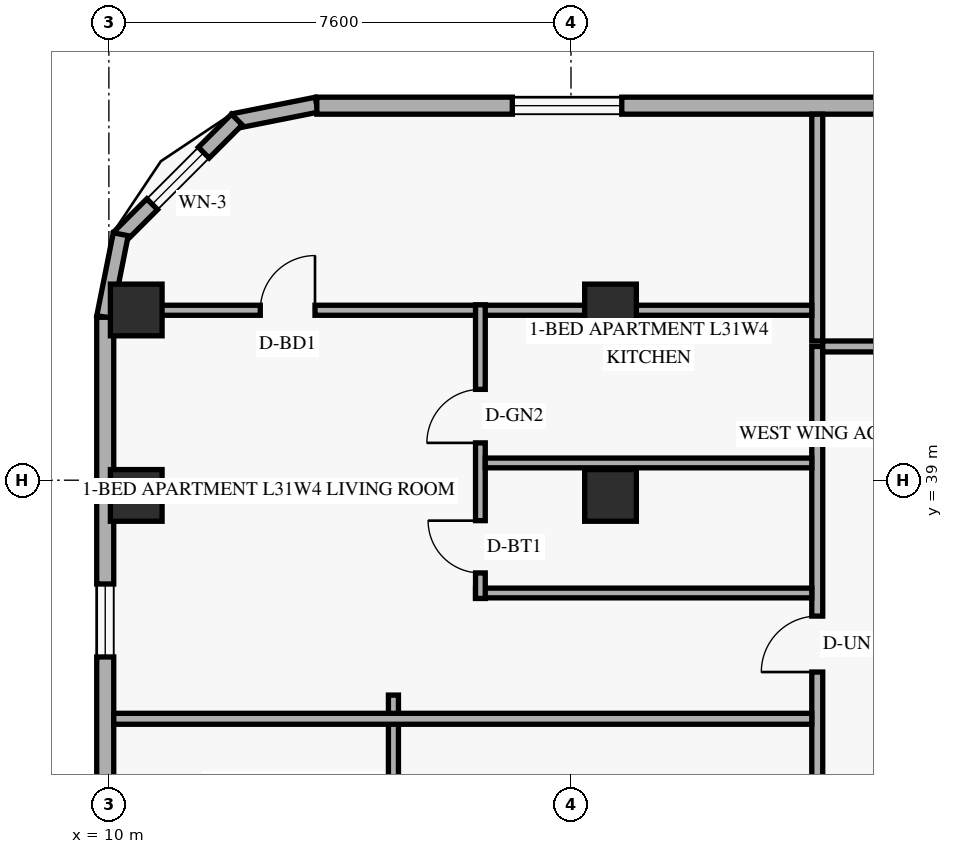
"""IFC4 building model, lengths in metres.
Left out: names, types, materials, properties, quantities, classifications, styles, units other than length and angle.
Written with IfcOpenShell. Run it as: python <this file> out.ifc"""

import sys

from ifc_helpers import new_model, si_unit, direction, frame, frame_2d, origin, origin_2d, place, context, subcontext, project, spatial, rectangle, extrude, element, fill, save


model = new_model("IFC4")
c1 = context("Model", 3, precision=1e-05, world=origin(), true_north=direction((0.0, 1.0)))
c2 = subcontext(c1, "Body", "Model", "MODEL_VIEW")
j1 = project(units=[si_unit("LENGTHUNIT", "METRE"), si_unit("PLANEANGLEUNIT", "RADIAN")], contexts=[c1])
p1 = place(None, origin())
s1 = spatial("IfcSite", under=j1, at=p1, CompositionType="ELEMENT")
p2 = place(p1, origin())
s2 = spatial("IfcBuilding", under=s1, at=p2, CompositionType="ELEMENT")
p3 = place(p2, frame((0.0, 0.0, 121.2)))
s3 = spatial("IfcBuildingStorey", under=s2, at=p3, CompositionType="ELEMENT", Elevation=121.2)
for number, where, z_axis, x_axis in (
    (1, (10.45, 38.75, 0.0), (0.0, 0.0, 1.0), (1.0, 0.0, 0.0)),
    (2, (10.45, 41.8, 0.0), (0.0, 0.0, 1.0), (1.0, 0.0, 0.0)),
    (3, (18.25, 38.75, 0.0), (0.0, 0.0, 1.0), (1.0, 0.0, 0.0)),
    (4, (18.25, 41.8, 0.0), (0.0, 0.0, 1.0), (1.0, 0.0, 0.0)),
):
    element("IfcColumn", number, at=place(p3, frame(where, z_axis=z_axis, x_axis=x_axis)), inside=s3, PredefinedType="COLUMN", context=c2, shape_type="SweptSolid", body=[
        extrude(rectangle(XDim=0.85, YDim=0.85, at=origin_2d()), origin(), (0.0, 0.0, 1.0), 3.6),
    ])
p4 = place(p3, frame((13.417, 45.176, 0.0), z_axis=(0.0, 0.0, 1.0), x_axis=(-0.980809899341, -0.19496651342, 0.0)))
e5 = element("IfcWall", 5, at=p4, inside=s3, PredefinedType="SOLIDWALL", context=c2, shape_type="SweptSolid", body=[
    extrude(rectangle(XDim=1.389, YDim=0.25, at=frame_2d((0.694, 0.0))), origin(), (0.0, 0.0, 1.0), 3.36),
])
p5 = place(p3, frame((12.105, 44.932, 0.0), z_axis=(0.0, 0.0, 1.0), x_axis=(-0.707151344399, -0.707062215165, 0.0)))
e6 = element("IfcWall", 6, at=p5, inside=s3, PredefinedType="SOLIDWALL", context=c2, shape_type="SweptSolid", body=[
    extrude(rectangle(XDim=2.739, YDim=0.25, at=frame_2d((1.37, 0.0))), origin(), (0.0, 0.0, 1.0), 3.36),
])
p6 = place(p5, frame((0.77, 0.0, 0.85)))
e7 = element("IfcOpeningElement", 7, at=p6, cuts=e6, PredefinedType="OPENING", context=c2, shape_type="SweptSolid", body=[
    extrude(rectangle(XDim=1.2, YDim=1.5, at=frame_2d((0.6, 0.75))), frame((0.0, 0.135, 0.0), z_axis=(0.0, -1.0, 0.0), x_axis=(1.0, 0.0, 0.0)), (0.0, 0.0, 1.0), 0.27),
])
p7 = place(p3, frame((10.195, 43.045, 0.0), z_axis=(0.0, 0.0, 1.0), x_axis=(-0.195000137217, -0.980803214965, 0.0)))
e8 = element("IfcWall", 8, at=p7, inside=s3, PredefinedType="SOLIDWALL", context=c2, shape_type="SweptSolid", body=[
    extrude(rectangle(XDim=1.388, YDim=0.25, at=frame_2d((0.694, 0.0))), origin(), (0.0, 0.0, 1.0), 3.36),
])
p8 = place(p3, frame((49.98, 45.16, 0.0), z_axis=(0.0, 0.0, 1.0), x_axis=(-1.0, 0.0, 0.0)))
e9 = element("IfcWall", 9, at=p8, inside=s3, PredefinedType="SOLIDWALL", context=c2, shape_type="SweptSolid", body=[
    extrude(rectangle(XDim=36.56, YDim=0.28, at=frame_2d((18.28, 0.0))), origin(), (0.0, 0.0, 1.0), 3.36),
])
p9 = place(p8, frame((31.545, 0.0, 0.85)))
e10 = element("IfcOpeningElement", 10, at=p9, cuts=e9, PredefinedType="OPENING", context=c2, shape_type="SweptSolid", body=[
    extrude(rectangle(XDim=1.8, YDim=1.6, at=frame_2d((0.9, 0.8))), frame((0.0, 0.15, 0.0), z_axis=(0.0, -1.0, 0.0), x_axis=(1.0, 0.0, 0.0)), (0.0, 0.0, 1.0), 0.3),
])
p10 = place(p8, frame((23.48, 0.0, 0.85)))
e11 = element("IfcOpeningElement", 11, at=p10, cuts=e9, PredefinedType="OPENING", context=c2, shape_type="SweptSolid", body=[
    extrude(rectangle(XDim=1.8, YDim=1.6, at=frame_2d((0.9, 0.8))), frame((0.0, 0.15, 0.0), z_axis=(0.0, -1.0, 0.0), x_axis=(1.0, 0.0, 0.0)), (0.0, 0.0, 1.0), 0.3),
])
p11 = place(p8, frame((16.595, 0.0, 0.85)))
e12 = element("IfcOpeningElement", 12, at=p11, cuts=e9, PredefinedType="OPENING", context=c2, shape_type="SweptSolid", body=[
    extrude(rectangle(XDim=1.8, YDim=1.6, at=frame_2d((0.9, 0.8))), frame((0.0, 0.15, 0.0), z_axis=(0.0, -1.0, 0.0), x_axis=(1.0, 0.0, 0.0)), (0.0, 0.0, 1.0), 0.3),
])
p12 = place(p8, frame((10.365, 0.0, 0.85)))
e13 = element("IfcOpeningElement", 13, at=p12, cuts=e9, PredefinedType="OPENING", context=c2, shape_type="SweptSolid", body=[
    extrude(rectangle(XDim=1.8, YDim=1.6, at=frame_2d((0.9, 0.8))), frame((0.0, 0.15, 0.0), z_axis=(0.0, -1.0, 0.0), x_axis=(1.0, 0.0, 0.0)), (0.0, 0.0, 1.0), 0.3),
])
p13 = place(p8, frame((4.575, 0.0, 0.85)))
e14 = element("IfcOpeningElement", 14, at=p13, cuts=e9, PredefinedType="OPENING", context=c2, shape_type="SweptSolid", body=[
    extrude(rectangle(XDim=1.8, YDim=1.6, at=frame_2d((0.9, 0.8))), frame((0.0, 0.15, 0.0), z_axis=(0.0, -1.0, 0.0), x_axis=(1.0, 0.0, 0.0)), (0.0, 0.0, 1.0), 0.3),
])
p14 = place(p8, frame((0.59, 0.0, 0.85)))
e15 = element("IfcOpeningElement", 15, at=p14, cuts=e9, PredefinedType="OPENING", context=c2, shape_type="SweptSolid", body=[
    extrude(rectangle(XDim=1.8, YDim=1.6, at=frame_2d((0.9, 0.8))), frame((0.0, 0.15, 0.0), z_axis=(0.0, -1.0, 0.0), x_axis=(1.0, 0.0, 0.0)), (0.0, 0.0, 1.0), 0.3),
])
p15 = place(p3, frame((9.94, 41.68, 0.0), z_axis=(0.0, 0.0, 1.0), x_axis=(0.0, -1.0, 0.0)))
e16 = element("IfcWall", 16, at=p15, inside=s3, PredefinedType="SOLIDWALL", context=c2, shape_type="SweptSolid", body=[
    extrude(rectangle(XDim=35.36, YDim=0.28, at=frame_2d((17.68, 0.0))), origin(), (0.0, 0.0, 1.0), 3.36),
])
p16 = place(p15, frame((29.773, 0.0, 0.85)))
e17 = element("IfcOpeningElement", 17, at=p16, cuts=e16, PredefinedType="OPENING", context=c2, shape_type="SweptSolid", body=[
    extrude(rectangle(XDim=1.2, YDim=1.5, at=frame_2d((0.6, 0.75))), frame((0.0, 0.15, 0.0), z_axis=(0.0, -1.0, 0.0), x_axis=(1.0, 0.0, 0.0)), (0.0, 0.0, 1.0), 0.3),
])
p17 = place(p15, frame((26.063, 0.0, 0.85)))
e18 = element("IfcOpeningElement", 18, at=p17, cuts=e16, PredefinedType="OPENING", context=c2, shape_type="SweptSolid", body=[
    extrude(rectangle(XDim=1.2, YDim=1.5, at=frame_2d((0.6, 0.75))), frame((0.0, 0.15, 0.0), z_axis=(0.0, -1.0, 0.0), x_axis=(1.0, 0.0, 0.0)), (0.0, 0.0, 1.0), 0.3),
])
p18 = place(p15, frame((19.032, 0.0, 0.85)))
e19 = element("IfcOpeningElement", 19, at=p18, cuts=e16, PredefinedType="OPENING", context=c2, shape_type="SweptSolid", body=[
    extrude(rectangle(XDim=1.2, YDim=1.5, at=frame_2d((0.6, 0.75))), frame((0.0, 0.15, 0.0), z_axis=(0.0, -1.0, 0.0), x_axis=(1.0, 0.0, 0.0)), (0.0, 0.0, 1.0), 0.3),
])
p19 = place(p15, frame((14.2, 0.0, 0.85)))
e20 = element("IfcOpeningElement", 20, at=p19, cuts=e16, PredefinedType="OPENING", context=c2, shape_type="SweptSolid", body=[
    extrude(rectangle(XDim=1.2, YDim=1.5, at=frame_2d((0.6, 0.75))), frame((0.0, 0.15, 0.0), z_axis=(0.0, -1.0, 0.0), x_axis=(1.0, 0.0, 0.0)), (0.0, 0.0, 1.0), 0.3),
])
p20 = place(p15, frame((7.956, 0.0, 0.85)))
e21 = element("IfcOpeningElement", 21, at=p20, cuts=e16, PredefinedType="OPENING", context=c2, shape_type="SweptSolid", body=[
    extrude(rectangle(XDim=1.2, YDim=1.5, at=frame_2d((0.6, 0.75))), frame((0.0, 0.15, 0.0), z_axis=(0.0, -1.0, 0.0), x_axis=(1.0, 0.0, 0.0)), (0.0, 0.0, 1.0), 0.3),
])
p21 = place(p15, frame((4.387, 0.0, 0.85)))
e22 = element("IfcOpeningElement", 22, at=p21, cuts=e16, PredefinedType="OPENING", context=c2, shape_type="SweptSolid", body=[
    extrude(rectangle(XDim=1.2, YDim=1.5, at=frame_2d((0.6, 0.75))), frame((0.0, 0.15, 0.0), z_axis=(0.0, -1.0, 0.0), x_axis=(1.0, 0.0, 0.0)), (0.0, 0.0, 1.0), 0.3),
])
p22 = place(p3, frame((21.65, 6.8, 0.0), z_axis=(0.0, 0.0, 1.0), x_axis=(0.0, 1.0, 0.0)))
e23 = element("IfcWall", 23, at=p22, inside=s3, PredefinedType="STANDARD", context=c2, shape_type="SweptSolid", body=[
    extrude(rectangle(XDim=34.4, YDim=0.18, at=frame_2d((17.2, 0.0))), origin(), (0.0, 0.0, 1.0), 2.731),
])
p23 = place(p22, frame((4.472, 0.0, 0.0)))
e24 = element("IfcOpeningElement", 24, at=p23, cuts=e23, PredefinedType="OPENING", context=c2, shape_type="SweptSolid", body=[
    extrude(rectangle(XDim=0.92, YDim=2.15, at=frame_2d((0.46, 1.075))), frame((0.0, 0.1, 0.0), z_axis=(0.0, -1.0, 0.0), x_axis=(1.0, 0.0, 0.0)), (0.0, 0.0, 1.0), 0.2),
])
p24 = place(p22, frame((7.261, 0.0, 0.0)))
e25 = element("IfcOpeningElement", 25, at=p24, cuts=e23, PredefinedType="OPENING", context=c2, shape_type="SweptSolid", body=[
    extrude(rectangle(XDim=0.92, YDim=2.15, at=frame_2d((0.46, 1.075))), frame((0.0, 0.1, 0.0), z_axis=(0.0, -1.0, 0.0), x_axis=(1.0, 0.0, 0.0)), (0.0, 0.0, 1.0), 0.2),
])
p25 = place(p22, frame((18.308, 0.0, 0.0)))
e26 = element("IfcOpeningElement", 26, at=p25, cuts=e23, PredefinedType="OPENING", context=c2, shape_type="SweptSolid", body=[
    extrude(rectangle(XDim=0.92, YDim=2.15, at=frame_2d((0.46, 1.075))), frame((0.0, 0.1, 0.0), z_axis=(0.0, -1.0, 0.0), x_axis=(1.0, 0.0, 0.0)), (0.0, 0.0, 1.0), 0.2),
])
p26 = place(p22, frame((29.045, 0.0, 0.0)))
e27 = element("IfcOpeningElement", 27, at=p26, cuts=e23, PredefinedType="OPENING", context=c2, shape_type="SweptSolid", body=[
    extrude(rectangle(XDim=0.92, YDim=2.15, at=frame_2d((0.46, 1.075))), frame((0.0, 0.1, 0.0), z_axis=(0.0, -1.0, 0.0), x_axis=(1.0, 0.0, 0.0)), (0.0, 0.0, 1.0), 0.2),
])
p27 = place(p3, frame((21.74, 41.2, 0.0), z_axis=(0.0, 0.0, 1.0), x_axis=(1.0, 0.0, 0.0)))
e28 = element("IfcWall", 28, at=p27, inside=s3, PredefinedType="STANDARD", context=c2, shape_type="SweptSolid", body=[
    extrude(rectangle(XDim=13.68, YDim=0.18, at=frame_2d((6.84, 0.0))), origin(), (0.0, 0.0, 1.0), 2.731),
])
p28 = place(p27, frame((3.09, 0.0, 0.0)))
e29 = element("IfcOpeningElement", 29, at=p28, cuts=e28, PredefinedType="OPENING", context=c2, shape_type="SweptSolid", body=[
    extrude(rectangle(XDim=0.95, YDim=2.15, at=frame_2d((0.475, 1.075))), frame((0.0, 0.1, 0.0), z_axis=(0.0, -1.0, 0.0), x_axis=(1.0, 0.0, 0.0)), (0.0, 0.0, 1.0), 0.2),
])
p29 = place(p27, frame((10.11, 0.0, 0.0)))
e30 = element("IfcOpeningElement", 30, at=p29, cuts=e28, PredefinedType="OPENING", context=c2, shape_type="SweptSolid", body=[
    extrude(rectangle(XDim=0.95, YDim=2.15, at=frame_2d((0.475, 1.075))), frame((0.0, 0.1, 0.0), z_axis=(0.0, -1.0, 0.0), x_axis=(1.0, 0.0, 0.0)), (0.0, 0.0, 1.0), 0.2),
])
p30 = place(p3, frame((21.65, 41.29, 0.0), z_axis=(0.0, 0.0, 1.0), x_axis=(0.0, 1.0, 0.0)))
e31 = element("IfcWall", 31, at=p30, inside=s3, PredefinedType="PARTITIONING", context=c2, shape_type="SweptSolid", body=[
    extrude(rectangle(XDim=3.73, YDim=0.18, at=frame_2d((1.865, 0.0))), origin(), (0.0, 0.0, 1.0), 2.809),
])
p31 = place(p3, frame((14.68, 31.092, 0.0), z_axis=(0.0, 0.0, 1.0), x_axis=(0.0, 1.0, 0.0)))
e32 = element("IfcWall", 32, at=p31, inside=s3, PredefinedType="PARTITIONING", context=c2, shape_type="SweptSolid", body=[
    extrude(rectangle(XDim=4.374, YDim=0.165, at=frame_2d((2.187, 0.0))), origin(), (0.0, 0.0, 1.0), 2.988),
])
p32 = place(p3, frame((10.08, 35.076, 0.0), z_axis=(0.0, 0.0, 1.0), x_axis=(1.0, 0.0, 0.0)))
e33 = element("IfcWall", 33, at=p32, inside=s3, PredefinedType="PARTITIONING", context=c2, shape_type="SweptSolid", body=[
    extrude(rectangle(XDim=11.48, YDim=0.18, at=frame_2d((5.74, 0.0))), origin(), (0.0, 0.0, 1.0), 2.731),
])
p33 = place(p3, frame((10.099, 41.795, 0.0), z_axis=(0.0, 0.0, 1.0), x_axis=(1.0, 0.0, 0.0)))
e34 = element("IfcWall", 34, at=p33, inside=s3, PredefinedType="PARTITIONING", context=c2, shape_type="SweptSolid", body=[
    extrude(rectangle(XDim=11.461, YDim=0.165, at=frame_2d((5.73, 0.0))), origin(), (0.0, 0.0, 1.0), 2.809),
])
p34 = place(p33, frame((2.391, 0.0, 0.0)))
e35 = element("IfcOpeningElement", 35, at=p34, cuts=e34, PredefinedType="OPENING", context=c2, shape_type="SweptSolid", body=[
    extrude(rectangle(XDim=0.9, YDim=2.14, at=frame_2d((0.45, 1.07))), frame((0.0, 0.093, 0.0), z_axis=(0.0, -1.0, 0.0), x_axis=(1.0, 0.0, 0.0)), (0.0, 0.0, 1.0), 0.185),
])
p35 = place(p3, frame((16.03, 37.145, 0.0), z_axis=(0.0, 0.0, 1.0), x_axis=(1.0, 0.0, 0.0)))
e36 = element("IfcWall", 36, at=p35, inside=s3, PredefinedType="PLUMBINGWALL", context=c2, shape_type="SweptSolid", body=[
    extrude(rectangle(XDim=5.53, YDim=0.16, at=frame_2d((2.765, 0.0))), origin(), (0.0, 0.0, 1.0), 2.731),
])
p36 = place(p3, frame((16.11, 37.055, 0.0), z_axis=(0.0, 0.0, 1.0), x_axis=(0.0, 1.0, 0.0)))
e37 = element("IfcWall", 37, at=p36, inside=s3, PredefinedType="PLUMBINGWALL", context=c2, shape_type="SweptSolid", body=[
    extrude(rectangle(XDim=4.83, YDim=0.16, at=frame_2d((2.415, 0.0))), origin(), (0.0, 0.0, 1.0), 2.731),
])
p37 = place(p36, frame((0.42, 0.0, 0.0)))
e38 = element("IfcOpeningElement", 38, at=p37, cuts=e37, PredefinedType="OPENING", context=c2, shape_type="SweptSolid", body=[
    extrude(rectangle(XDim=0.86, YDim=2.12, at=frame_2d((0.43, 1.06))), frame((0.0, 0.09, 0.0), z_axis=(0.0, -1.0, 0.0), x_axis=(1.0, 0.0, 0.0)), (0.0, 0.0, 1.0), 0.18),
])
p38 = place(p36, frame((2.559, 0.0, 0.0)))
e39 = element("IfcOpeningElement", 39, at=p38, cuts=e37, PredefinedType="OPENING", context=c2, shape_type="SweptSolid", body=[
    extrude(rectangle(XDim=0.88, YDim=2.12, at=frame_2d((0.44, 1.06))), frame((0.0, 0.09, 0.0), z_axis=(0.0, -1.0, 0.0), x_axis=(1.0, 0.0, 0.0)), (0.0, 0.0, 1.0), 0.18),
])
p39 = place(p3, frame((16.19, 39.284, 0.0), z_axis=(0.0, 0.0, 1.0), x_axis=(1.0, 0.0, 0.0)))
e40 = element("IfcWall", 40, at=p39, inside=s3, PredefinedType="PLUMBINGWALL", context=c2, shape_type="SweptSolid", body=[
    extrude(rectangle(XDim=5.37, YDim=0.16, at=frame_2d((2.685, 0.0))), origin(), (0.0, 0.0, 1.0), 2.731),
])
p40 = place(p6, origin())
e41 = element("IfcWindow", 41, at=p40, inside=s3, PartitioningType="SINGLE_PANEL", PredefinedType="WINDOW", context=c2, shape_type="SweptSolid", body=[
    extrude(rectangle(XDim=1.2, YDim=1.5, at=frame_2d((0.6, 0.75))), frame((0.0, 0.03, 0.0), z_axis=(0.0, -1.0, 0.0), x_axis=(1.0, 0.0, 0.0)), (0.0, 0.0, 1.0), 0.06),
])
fill(e7, e41)
p41 = place(p9, origin())
e42 = element("IfcWindow", 42, at=p41, inside=s3, PartitioningType="SINGLE_PANEL", PredefinedType="WINDOW", context=c2, shape_type="SweptSolid", body=[
    extrude(rectangle(XDim=1.8, YDim=1.6, at=frame_2d((0.9, 0.8))), frame((0.0, 0.03, 0.0), z_axis=(0.0, -1.0, 0.0), x_axis=(1.0, 0.0, 0.0)), (0.0, 0.0, 1.0), 0.06),
])
fill(e10, e42)
p42 = place(p21, origin())
e43 = element("IfcWindow", 43, at=p42, inside=s3, PartitioningType="SINGLE_PANEL", PredefinedType="WINDOW", context=c2, shape_type="SweptSolid", body=[
    extrude(rectangle(XDim=1.2, YDim=1.5, at=frame_2d((0.6, 0.75))), frame((0.0, 0.03, 0.0), z_axis=(0.0, -1.0, 0.0), x_axis=(1.0, 0.0, 0.0)), (0.0, 0.0, 1.0), 0.06),
])
fill(e22, e43)
p43 = place(p26, origin())
e44 = element("IfcDoor", 44, at=p43, inside=s3, OperationType="SINGLE_SWING_LEFT", PredefinedType="DOOR", context=c2, shape_type="SweptSolid", body=[
    extrude(rectangle(XDim=0.92, YDim=2.15, at=frame_2d((0.46, 1.075))), frame((0.0, 0.025, 0.0), z_axis=(0.0, -1.0, 0.0), x_axis=(1.0, 0.0, 0.0)), (0.0, 0.0, 1.0), 0.05),
])
fill(e27, e44)
p44 = place(p37, origin())
e45 = element("IfcDoor", 45, at=p44, inside=s3, OperationType="SINGLE_SWING_RIGHT", PredefinedType="DOOR", context=c2, shape_type="SweptSolid", body=[
    extrude(rectangle(XDim=0.86, YDim=2.12, at=frame_2d((0.43, 1.06))), frame((0.0, 0.025, 0.0), z_axis=(0.0, -1.0, 0.0), x_axis=(1.0, 0.0, 0.0)), (0.0, 0.0, 1.0), 0.05),
])
fill(e38, e45)
p45 = place(p38, origin())
e46 = element("IfcDoor", 46, at=p45, inside=s3, OperationType="SINGLE_SWING_LEFT", PredefinedType="DOOR", context=c2, shape_type="SweptSolid", body=[
    extrude(rectangle(XDim=0.88, YDim=2.12, at=frame_2d((0.44, 1.06))), frame((0.0, 0.025, 0.0), z_axis=(0.0, -1.0, 0.0), x_axis=(1.0, 0.0, 0.0)), (0.0, 0.0, 1.0), 0.05),
])
fill(e39, e46)
p46 = place(p34, origin())
e47 = element("IfcDoor", 47, at=p46, inside=s3, OperationType="SINGLE_SWING_RIGHT", PredefinedType="DOOR", context=c2, shape_type="SweptSolid", body=[
    extrude(rectangle(XDim=0.9, YDim=2.14, at=frame_2d((0.45, 1.07))), frame((0.0, 0.025, 0.0), z_axis=(0.0, -1.0, 0.0), x_axis=(1.0, 0.0, 0.0)), (0.0, 0.0, 1.0), 0.05),
])
fill(e35, e47)
save(model, sys.argv[1])
